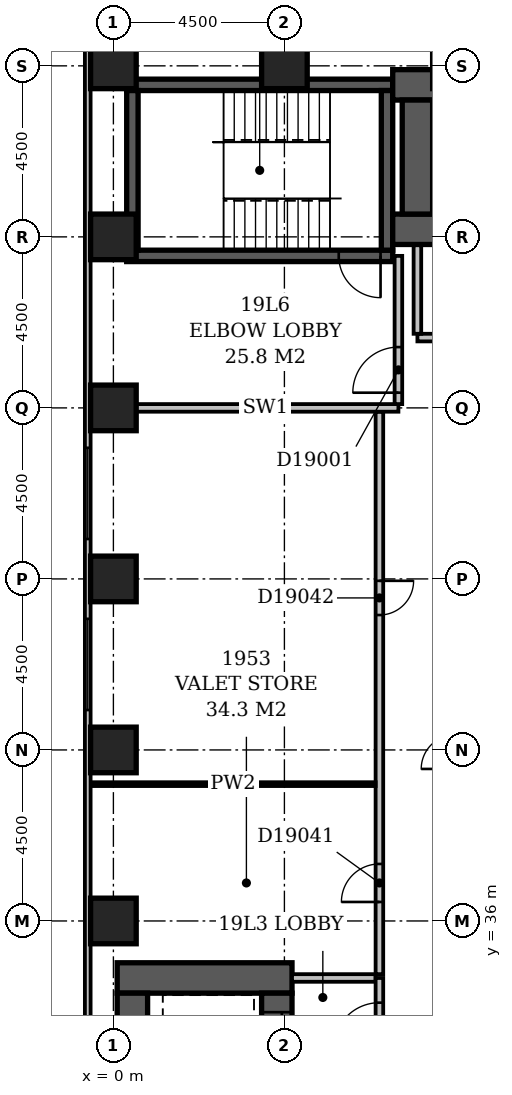
"""IFC4 building model, lengths in metres.
Left out: names, types, materials, properties, quantities, classifications, styles, units other than length and angle.
Written with IfcOpenShell. Run it as: python <this file> out.ifc"""

import sys

from ifc_helpers import new_model, si_unit, direction, frame, frame_2d, origin, origin_2d, place, context, subcontext, project, spatial, rectangle, extrude, element, fill, save


model = new_model("IFC4")
c1 = context("Model", 3, precision=1e-05, world=origin(), true_north=direction((0.0, 1.0)))
c2 = subcontext(c1, "Body", "Model", "MODEL_VIEW")
j1 = project(units=[si_unit("LENGTHUNIT", "METRE"), si_unit("PLANEANGLEUNIT", "RADIAN")], contexts=[c1])
p1 = place(None, origin())
s1 = spatial("IfcSite", under=j1, at=p1, CompositionType="ELEMENT")
p2 = place(p1, origin())
s2 = spatial("IfcBuilding", under=s1, at=p2, CompositionType="ELEMENT")
p3 = place(p2, frame((0.0, 0.0, 79.4)))
s3 = spatial("IfcBuildingStorey", under=s2, at=p3, CompositionType="ELEMENT", Elevation=79.4)
p4 = place(p3, frame((0.1, 34.5, -0.3), z_axis=(0.0, 0.0, 1.0), x_axis=(1.0, 0.0, 0.0)))
e1 = element("IfcWall", 1, at=p4, inside=s3, PredefinedType="SHEAR", context=c2, shape_type="SweptSolid", body=[
    extrude(rectangle(XDim=4.6, YDim=0.8, at=frame_2d((2.3, 0.0))), origin(), (0.0, 0.0, 1.0), 3.6),
])
p5 = place(p3, frame((0.35, 53.5, -0.3), z_axis=(0.0, 0.0, 1.0), x_axis=(1.0, 0.0, 0.0)))
e2 = element("IfcWall", 2, at=p5, inside=s3, PredefinedType="SHEAR", context=c2, shape_type="SweptSolid", body=[
    extrude(rectangle(XDim=7.0, YDim=0.3, at=frame_2d((3.5, 0.0))), origin(), (0.0, 0.0, 1.0), 3.6),
])
p6 = place(p5, frame((5.58, 0.0, 0.3)))
e3 = element("IfcOpeningElement", 3, at=p6, cuts=e2, PredefinedType="OPENING", context=c2, shape_type="SweptSolid", body=[
    extrude(rectangle(XDim=1.1, YDim=2.1, at=frame_2d((0.55, 1.05))), frame((0.0, 0.162, 0.0), z_axis=(0.0, -1.0, 0.0), x_axis=(1.0, 0.0, 0.0)), (0.0, 0.0, 1.0), 0.324),
])
p7 = place(p3, frame((0.35, 58.0, -0.3), z_axis=(0.0, 0.0, 1.0), x_axis=(1.0, 0.0, 0.0)))
e4 = element("IfcWall", 4, at=p7, inside=s3, PredefinedType="SHEAR", context=c2, shape_type="SweptSolid", body=[
    extrude(rectangle(XDim=7.0, YDim=0.3, at=frame_2d((3.5, 0.0))), origin(), (0.0, 0.0, 1.0), 3.6),
])
p8 = place(p3, frame((0.5, 27.15, -0.3), z_axis=(0.0, 0.0, 1.0), x_axis=(0.0, 1.0, 0.0)))
e5 = element("IfcWall", 5, at=p8, inside=s3, PredefinedType="SHEAR", context=c2, shape_type="SweptSolid", body=[
    extrude(rectangle(XDim=6.95, YDim=0.8, at=frame_2d((3.475, 0.0))), origin(), (0.0, 0.0, 1.0), 3.6),
])
p9 = place(p3, frame((0.5, 53.65, -0.3), z_axis=(0.0, 0.0, 1.0), x_axis=(0.0, 1.0, 0.0)))
e6 = element("IfcWall", 6, at=p9, inside=s3, PredefinedType="SHEAR", context=c2, shape_type="SweptSolid", body=[
    extrude(rectangle(XDim=4.2, YDim=0.3, at=frame_2d((2.1, 0.0))), origin(), (0.0, 0.0, 1.0), 3.6),
])
p10 = place(p3, frame((4.3, 27.15, -0.3), z_axis=(0.0, 0.0, 1.0), x_axis=(0.0, 1.0, 0.0)))
e7 = element("IfcWall", 7, at=p10, inside=s3, PredefinedType="SHEAR", context=c2, shape_type="SweptSolid", body=[
    extrude(rectangle(XDim=6.95, YDim=0.8, at=frame_2d((3.475, 0.0))), origin(), (0.0, 0.0, 1.0), 3.6),
])
p11 = place(p10, frame((3.05, 0.0, 0.3)))
e8 = element("IfcOpeningElement", 8, at=p11, cuts=e7, PredefinedType="OPENING", context=c2, shape_type="SweptSolid", body=[
    extrude(rectangle(XDim=1.1, YDim=2.1, at=frame_2d((0.55, 1.05))), frame((0.0, 0.412, 0.0), z_axis=(0.0, -1.0, 0.0), x_axis=(1.0, 0.0, 0.0)), (0.0, 0.0, 1.0), 0.824),
])
p12 = place(p10, frame((0.55, 0.0, 0.3)))
e9 = element("IfcOpeningElement", 9, at=p12, cuts=e7, PredefinedType="OPENING", context=c2, shape_type="SweptSolid", body=[
    extrude(rectangle(XDim=1.1, YDim=2.1, at=frame_2d((0.55, 1.05))), frame((0.0, 0.412, 0.0), z_axis=(0.0, -1.0, 0.0), x_axis=(1.0, 0.0, 0.0)), (0.0, 0.0, 1.0), 0.824),
])
p13 = place(p10, frame((5.35, 0.0, 0.3)))
e10 = element("IfcOpeningElement", 10, at=p13, cuts=e7, PredefinedType="OPENING", context=c2, shape_type="SweptSolid", body=[
    extrude(rectangle(XDim=1.1, YDim=2.1, at=frame_2d((0.55, 1.05))), frame((0.0, 0.412, 0.0), z_axis=(0.0, -1.0, 0.0), x_axis=(1.0, 0.0, 0.0)), (0.0, 0.0, 1.0), 0.824),
])
p14 = place(p3, frame((7.2, 53.65, -0.3), z_axis=(0.0, 0.0, 1.0), x_axis=(0.0, 1.0, 0.0)))
e11 = element("IfcWall", 11, at=p14, inside=s3, PredefinedType="SHEAR", context=c2, shape_type="SweptSolid", body=[
    extrude(rectangle(XDim=4.2, YDim=0.3, at=frame_2d((2.1, 0.0))), origin(), (0.0, 0.0, 1.0), 3.6),
])
p15 = place(p3, frame((7.35, 54.2, -0.3), z_axis=(0.0, 0.0, 1.0), x_axis=(1.0, 0.0, 0.0)))
e12 = element("IfcWall", 12, at=p15, inside=s3, PredefinedType="SHEAR", context=c2, shape_type="SweptSolid", body=[
    extrude(rectangle(XDim=16.45, YDim=0.8, at=frame_2d((8.225, 0.0))), origin(), (0.0, 0.0, 1.0), 3.6),
])
p16 = place(p15, frame((1.35, 0.0, 0.3)))
e13 = element("IfcOpeningElement", 13, at=p16, cuts=e12, PredefinedType="OPENING", context=c2, shape_type="SweptSolid", body=[
    extrude(rectangle(XDim=1.1, YDim=2.1, at=frame_2d((0.55, 1.05))), frame((0.0, 0.412, 0.0), z_axis=(0.0, -1.0, 0.0), x_axis=(1.0, 0.0, 0.0)), (0.0, 0.0, 1.0), 0.824),
])
p17 = place(p15, frame((3.85, 0.0, 0.3)))
e14 = element("IfcOpeningElement", 14, at=p17, cuts=e12, PredefinedType="OPENING", context=c2, shape_type="SweptSolid", body=[
    extrude(rectangle(XDim=1.1, YDim=2.1, at=frame_2d((0.55, 1.05))), frame((0.0, 0.412, 0.0), z_axis=(0.0, -1.0, 0.0), x_axis=(1.0, 0.0, 0.0)), (0.0, 0.0, 1.0), 0.824),
])
p18 = place(p15, frame((6.35, 0.0, 0.3)))
e15 = element("IfcOpeningElement", 15, at=p18, cuts=e12, PredefinedType="OPENING", context=c2, shape_type="SweptSolid", body=[
    extrude(rectangle(XDim=1.1, YDim=2.1, at=frame_2d((0.55, 1.05))), frame((0.0, 0.412, 0.0), z_axis=(0.0, -1.0, 0.0), x_axis=(1.0, 0.0, 0.0)), (0.0, 0.0, 1.0), 0.824),
])
p19 = place(p15, frame((8.85, 0.0, 0.3)))
e16 = element("IfcOpeningElement", 16, at=p19, cuts=e12, PredefinedType="OPENING", context=c2, shape_type="SweptSolid", body=[
    extrude(rectangle(XDim=1.1, YDim=2.1, at=frame_2d((0.55, 1.05))), frame((0.0, 0.412, 0.0), z_axis=(0.0, -1.0, 0.0), x_axis=(1.0, 0.0, 0.0)), (0.0, 0.0, 1.0), 0.824),
])
p20 = place(p15, frame((11.35, 0.0, 0.3)))
e17 = element("IfcOpeningElement", 17, at=p20, cuts=e12, PredefinedType="OPENING", context=c2, shape_type="SweptSolid", body=[
    extrude(rectangle(XDim=1.1, YDim=2.1, at=frame_2d((0.55, 1.05))), frame((0.0, 0.412, 0.0), z_axis=(0.0, -1.0, 0.0), x_axis=(1.0, 0.0, 0.0)), (0.0, 0.0, 1.0), 0.824),
])
p21 = place(p15, frame((13.85, 0.0, 0.3)))
e18 = element("IfcOpeningElement", 18, at=p21, cuts=e12, PredefinedType="OPENING", context=c2, shape_type="SweptSolid", body=[
    extrude(rectangle(XDim=1.1, YDim=2.1, at=frame_2d((0.55, 1.05))), frame((0.0, 0.412, 0.0), z_axis=(0.0, -1.0, 0.0), x_axis=(1.0, 0.0, 0.0)), (0.0, 0.0, 1.0), 0.824),
])
p22 = place(p3, frame((7.35, 58.0, -0.3), z_axis=(0.0, 0.0, 1.0), x_axis=(1.0, 0.0, 0.0)))
e19 = element("IfcWall", 19, at=p22, inside=s3, PredefinedType="SHEAR", context=c2, shape_type="SweptSolid", body=[
    extrude(rectangle(XDim=16.45, YDim=0.8, at=frame_2d((8.225, 0.0))), origin(), (0.0, 0.0, 1.0), 3.6),
])
p23 = place(p3, frame((8.0, 54.6, -0.3), z_axis=(0.0, 0.0, 1.0), x_axis=(0.0, 1.0, 0.0)))
e20 = element("IfcWall", 20, at=p23, inside=s3, PredefinedType="SHEAR", context=c2, shape_type="SweptSolid", body=[
    extrude(rectangle(XDim=3.0, YDim=0.8, at=frame_2d((1.5, 0.0))), origin(), (0.0, 0.0, 1.0), 3.6),
])
for number, where, z_axis, x_axis in (
    (21, (0.0, 36.0, -0.3), (0.0, 0.0, 1.0), (1.0, 0.0, 0.0)),
    (22, (0.0, 40.5, -0.3), (0.0, 0.0, 1.0), (1.0, 0.0, 0.0)),
    (23, (0.0, 45.0, -0.3), (0.0, 0.0, 1.0), (1.0, 0.0, 0.0)),
    (24, (0.0, 49.5, -0.3), (0.0, 0.0, 1.0), (1.0, 0.0, 0.0)),
    (25, (0.0, 54.0, -0.3), (0.0, 0.0, 1.0), (1.0, 0.0, 0.0)),
    (26, (0.0, 58.5, -0.3), (0.0, 0.0, 1.0), (1.0, 0.0, 0.0)),
    (27, (4.5, 58.5, -0.3), (0.0, 0.0, 1.0), (1.0, 0.0, 0.0)),
):
    element("IfcColumn", number, at=place(p3, frame(where, z_axis=z_axis, x_axis=x_axis)), inside=s3, PredefinedType="COLUMN", context=c2, shape_type="SweptSolid", body=[
        extrude(rectangle(XDim=1.2, YDim=1.2, at=origin_2d()), origin(), (0.0, 0.0, 1.0), 3.6),
    ])
p24 = place(p3, frame((-0.675, 59.1, 0.0), z_axis=(0.0, 0.0, 1.0), x_axis=(0.0, -1.0, 0.0)))
e28 = element("IfcWall", 28, at=p24, inside=s3, PredefinedType="STANDARD", context=c2, shape_type="SweptSolid", body=[
    extrude(rectangle(XDim=55.35, YDim=0.15, at=frame_2d((27.675, 0.0))), origin(), (0.0, 0.0, 1.0), 2.7),
])
p25 = place(p24, frame((10.65, 0.0, 0.6)))
e29 = element("IfcOpeningElement", 29, at=p25, cuts=e28, PredefinedType="OPENING", context=c2, shape_type="SweptSolid", body=[
    extrude(rectangle(XDim=2.4, YDim=1.8, at=frame_2d((1.2, 0.9))), frame((0.0, 0.087, 0.0), z_axis=(0.0, -1.0, 0.0), x_axis=(1.0, 0.0, 0.0)), (0.0, 0.0, 1.0), 0.174),
])
p26 = place(p24, frame((15.15, 0.0, 0.6)))
e30 = element("IfcOpeningElement", 30, at=p26, cuts=e28, PredefinedType="OPENING", context=c2, shape_type="SweptSolid", body=[
    extrude(rectangle(XDim=2.4, YDim=1.8, at=frame_2d((1.2, 0.9))), frame((0.0, 0.087, 0.0), z_axis=(0.0, -1.0, 0.0), x_axis=(1.0, 0.0, 0.0)), (0.0, 0.0, 1.0), 0.174),
])
p27 = place(p24, frame((42.15, 0.0, 0.6)))
e31 = element("IfcOpeningElement", 31, at=p27, cuts=e28, PredefinedType="OPENING", context=c2, shape_type="SweptSolid", body=[
    extrude(rectangle(XDim=2.4, YDim=1.8, at=frame_2d((1.2, 0.9))), frame((0.0, 0.087, 0.0), z_axis=(0.0, -1.0, 0.0), x_axis=(1.0, 0.0, 0.0)), (0.0, 0.0, 1.0), 0.174),
])
p28 = place(p3, frame((8.0, 51.35, 0.0), z_axis=(0.0, 0.0, 1.0), x_axis=(1.0, 0.0, 0.0)))
e32 = element("IfcWall", 32, at=p28, inside=s3, PredefinedType="PARTITIONING", context=c2, shape_type="SweptSolid", body=[
    extrude(rectangle(XDim=15.0, YDim=0.2, at=frame_2d((7.5, 0.0))), origin(), (0.0, 0.0, 1.0), 3.3),
])
p29 = place(p28, frame((3.4, 0.0, 0.0)))
e33 = element("IfcOpeningElement", 33, at=p29, cuts=e32, PredefinedType="OPENING", context=c2, shape_type="SweptSolid", body=[
    extrude(rectangle(XDim=1.2, YDim=2.1, at=frame_2d((0.6, 1.05))), frame((0.0, 0.112, 0.0), z_axis=(0.0, -1.0, 0.0), x_axis=(1.0, 0.0, 0.0)), (0.0, 0.0, 1.0), 0.224),
])
p30 = place(p28, frame((9.4, 0.0, 0.0)))
e34 = element("IfcOpeningElement", 34, at=p30, cuts=e32, PredefinedType="OPENING", context=c2, shape_type="SweptSolid", body=[
    extrude(rectangle(XDim=1.2, YDim=2.1, at=frame_2d((0.6, 1.05))), frame((0.0, 0.112, 0.0), z_axis=(0.0, -1.0, 0.0), x_axis=(1.0, 0.0, 0.0)), (0.0, 0.0, 1.0), 0.224),
])
p31 = place(p3, frame((8.0, 51.45, 0.0), z_axis=(0.0, 0.0, 1.0), x_axis=(0.0, 1.0, 0.0)))
e35 = element("IfcWall", 35, at=p31, inside=s3, PredefinedType="PARTITIONING", context=c2, shape_type="SweptSolid", body=[
    extrude(rectangle(XDim=2.33, YDim=0.2, at=frame_2d((1.165, 0.0))), origin(), (0.0, 0.0, 1.0), 3.3),
])
p32 = place(p3, frame((7.0, 32.1, 0.0), z_axis=(0.0, 0.0, 1.0), x_axis=(0.0, 1.0, 0.0)))
e36 = element("IfcWall", 36, at=p32, inside=s3, PredefinedType="PARTITIONING", context=c2, shape_type="SweptSolid", body=[
    extrude(rectangle(XDim=2.4, YDim=0.2, at=frame_2d((1.2, 0.0))), origin(), (0.0, 0.0, 1.0), 3.3),
])
p33 = place(p32, frame((0.55, 0.0, 0.0)))
e37 = element("IfcOpeningElement", 37, at=p33, cuts=e36, PredefinedType="OPENING", context=c2, shape_type="SweptSolid", body=[
    extrude(rectangle(XDim=1.2, YDim=2.1, at=frame_2d((0.6, 1.05))), frame((0.0, 0.112, 0.0), z_axis=(0.0, -1.0, 0.0), x_axis=(1.0, 0.0, 0.0)), (0.0, 0.0, 1.0), 0.224),
])
p34 = place(p3, frame((4.7, 34.5, 0.0), z_axis=(0.0, 0.0, 1.0), x_axis=(1.0, 0.0, 0.0)))
e38 = element("IfcWall", 38, at=p34, inside=s3, PredefinedType="PARTITIONING", context=c2, shape_type="SweptSolid", body=[
    extrude(rectangle(XDim=2.2, YDim=0.2, at=frame_2d((1.1, 0.0))), origin(), (0.0, 0.0, 1.0), 3.3),
])
p35 = place(p3, frame((0.5, 49.5, 0.0), z_axis=(0.0, 0.0, 1.0), x_axis=(1.0, 0.0, 0.0)))
e39 = element("IfcWall", 39, at=p35, inside=s3, PredefinedType="PARTITIONING", context=c2, shape_type="SweptSolid", body=[
    extrude(rectangle(XDim=7.0, YDim=0.2, at=frame_2d((3.5, 0.0))), origin(), (0.0, 0.0, 1.0), 3.3),
])
p36 = place(p3, frame((7.5, 49.6, 0.0), z_axis=(0.0, 0.0, 1.0), x_axis=(0.0, 1.0, 0.0)))
e40 = element("IfcWall", 40, at=p36, inside=s3, PredefinedType="PARTITIONING", context=c2, shape_type="SweptSolid", body=[
    extrude(rectangle(XDim=3.9, YDim=0.2, at=frame_2d((1.95, 0.0))), origin(), (0.0, 0.0, 1.0), 3.3),
])
p37 = place(p36, frame((0.3, 0.0, 0.0)))
e41 = element("IfcOpeningElement", 41, at=p37, cuts=e40, PredefinedType="OPENING", context=c2, shape_type="SweptSolid", body=[
    extrude(rectangle(XDim=1.2, YDim=2.1, at=frame_2d((0.6, 1.05))), frame((0.0, 0.112, 0.0), z_axis=(0.0, -1.0, 0.0), x_axis=(1.0, 0.0, 0.0)), (0.0, 0.0, 1.0), 0.224),
])
p38 = place(p3, frame((7.0, 34.6, 0.0), z_axis=(0.0, 0.0, 1.0), x_axis=(0.0, 1.0, 0.0)))
e42 = element("IfcWall", 42, at=p38, inside=s3, PredefinedType="PARTITIONING", context=c2, shape_type="SweptSolid", body=[
    extrude(rectangle(XDim=14.8, YDim=0.2, at=frame_2d((7.4, 0.0))), origin(), (0.0, 0.0, 1.0), 3.3),
])
p39 = place(p38, frame((1.9, 0.0, 0.0)))
e43 = element("IfcOpeningElement", 43, at=p39, cuts=e42, PredefinedType="OPENING", context=c2, shape_type="SweptSolid", body=[
    extrude(rectangle(XDim=1.0, YDim=2.1, at=frame_2d((0.5, 1.05))), frame((0.0, 0.112, 0.0), z_axis=(0.0, -1.0, 0.0), x_axis=(1.0, 0.0, 0.0)), (0.0, 0.0, 1.0), 0.224),
])
p40 = place(p38, frame((9.45, 0.0, 0.0)))
e44 = element("IfcOpeningElement", 44, at=p40, cuts=e42, PredefinedType="OPENING", context=c2, shape_type="SweptSolid", body=[
    extrude(rectangle(XDim=0.9, YDim=2.1, at=frame_2d((0.45, 1.05))), frame((0.0, 0.112, 0.0), z_axis=(0.0, -1.0, 0.0), x_axis=(1.0, 0.0, 0.0)), (0.0, 0.0, 1.0), 0.224),
])
p41 = place(p3, frame((-0.6, 39.6, 0.0), z_axis=(0.0, 0.0, 1.0), x_axis=(1.0, 0.0, 0.0)))
e45 = element("IfcWall", 45, at=p41, inside=s3, PredefinedType="PARTITIONING", context=c2, shape_type="SweptSolid", body=[
    extrude(rectangle(XDim=7.5, YDim=0.1, at=frame_2d((3.75, 0.0))), origin(), (0.0, 0.0, 1.0), 3.3),
])
p42 = place(p25, origin())
e46 = element("IfcWindow", 46, at=p42, inside=s3, PartitioningType="SINGLE_PANEL", PredefinedType="WINDOW", context=c2, shape_type="SweptSolid", body=[
    extrude(rectangle(XDim=2.4, YDim=1.8, at=frame_2d((1.2, 0.9))), frame((0.0, 0.03, 0.0), z_axis=(0.0, -1.0, 0.0), x_axis=(1.0, 0.0, 0.0)), (0.0, 0.0, 1.0), 0.06),
])
fill(e29, e46)
p43 = place(p26, origin())
e47 = element("IfcWindow", 47, at=p43, inside=s3, PartitioningType="SINGLE_PANEL", PredefinedType="WINDOW", context=c2, shape_type="SweptSolid", body=[
    extrude(rectangle(XDim=2.4, YDim=1.8, at=frame_2d((1.2, 0.9))), frame((0.0, 0.03, 0.0), z_axis=(0.0, -1.0, 0.0), x_axis=(1.0, 0.0, 0.0)), (0.0, 0.0, 1.0), 0.06),
])
fill(e30, e47)
p44 = place(p37, origin())
e48 = element("IfcDoor", 48, at=p44, inside=s3, OperationType="SINGLE_SWING_LEFT", PredefinedType="DOOR", context=c2, shape_type="SweptSolid", body=[
    extrude(rectangle(XDim=1.2, YDim=2.1, at=frame_2d((0.6, 1.05))), frame((0.0, 0.025, 0.0), z_axis=(0.0, -1.0, 0.0), x_axis=(1.0, 0.0, 0.0)), (0.0, 0.0, 1.0), 0.05),
])
fill(e41, e48)
p45 = place(p33, origin())
e49 = element("IfcDoor", 49, at=p45, inside=s3, OperationType="SINGLE_SWING_LEFT", PredefinedType="DOOR", context=c2, shape_type="SweptSolid", body=[
    extrude(rectangle(XDim=1.2, YDim=2.1, at=frame_2d((0.6, 1.05))), frame((0.0, 0.025, 0.0), z_axis=(0.0, -1.0, 0.0), x_axis=(1.0, 0.0, 0.0)), (0.0, 0.0, 1.0), 0.05),
])
fill(e37, e49)
p46 = place(p13, origin())
e50 = element("IfcDoor", 50, at=p46, inside=s3, OperationType="SLIDING_TO_LEFT", PredefinedType="DOOR", context=c2, shape_type="SweptSolid", body=[
    extrude(rectangle(XDim=1.1, YDim=2.1, at=frame_2d((0.55, 1.05))), frame((0.0, 0.025, 0.0), z_axis=(0.0, -1.0, 0.0), x_axis=(1.0, 0.0, 0.0)), (0.0, 0.0, 1.0), 0.05),
])
fill(e10, e50)
p47 = place(p6, origin())
e51 = element("IfcDoor", 51, at=p47, inside=s3, OperationType="SINGLE_SWING_RIGHT", PredefinedType="DOOR", context=c2, shape_type="SweptSolid", body=[
    extrude(rectangle(XDim=1.1, YDim=2.1, at=frame_2d((0.55, 1.05))), frame((0.0, 0.025, 0.0), z_axis=(0.0, -1.0, 0.0), x_axis=(1.0, 0.0, 0.0)), (0.0, 0.0, 1.0), 0.05),
])
fill(e3, e51)
p48 = place(p39, origin())
e52 = element("IfcDoor", 52, at=p48, inside=s3, OperationType="SINGLE_SWING_LEFT", PredefinedType="DOOR", context=c2, shape_type="SweptSolid", body=[
    extrude(rectangle(XDim=1.0, YDim=2.1, at=frame_2d((0.5, 1.05))), frame((0.0, 0.025, 0.0), z_axis=(0.0, -1.0, 0.0), x_axis=(1.0, 0.0, 0.0)), (0.0, 0.0, 1.0), 0.05),
])
fill(e43, e52)
p49 = place(p40, origin())
e53 = element("IfcDoor", 53, at=p49, inside=s3, OperationType="SINGLE_SWING_RIGHT", PredefinedType="DOOR", context=c2, shape_type="SweptSolid", body=[
    extrude(rectangle(XDim=0.9, YDim=2.1, at=frame_2d((0.45, 1.05))), frame((0.0, 0.025, 0.0), z_axis=(0.0, -1.0, 0.0), x_axis=(1.0, 0.0, 0.0)), (0.0, 0.0, 1.0), 0.05),
])
fill(e44, e53)
save(model, sys.argv[1])
